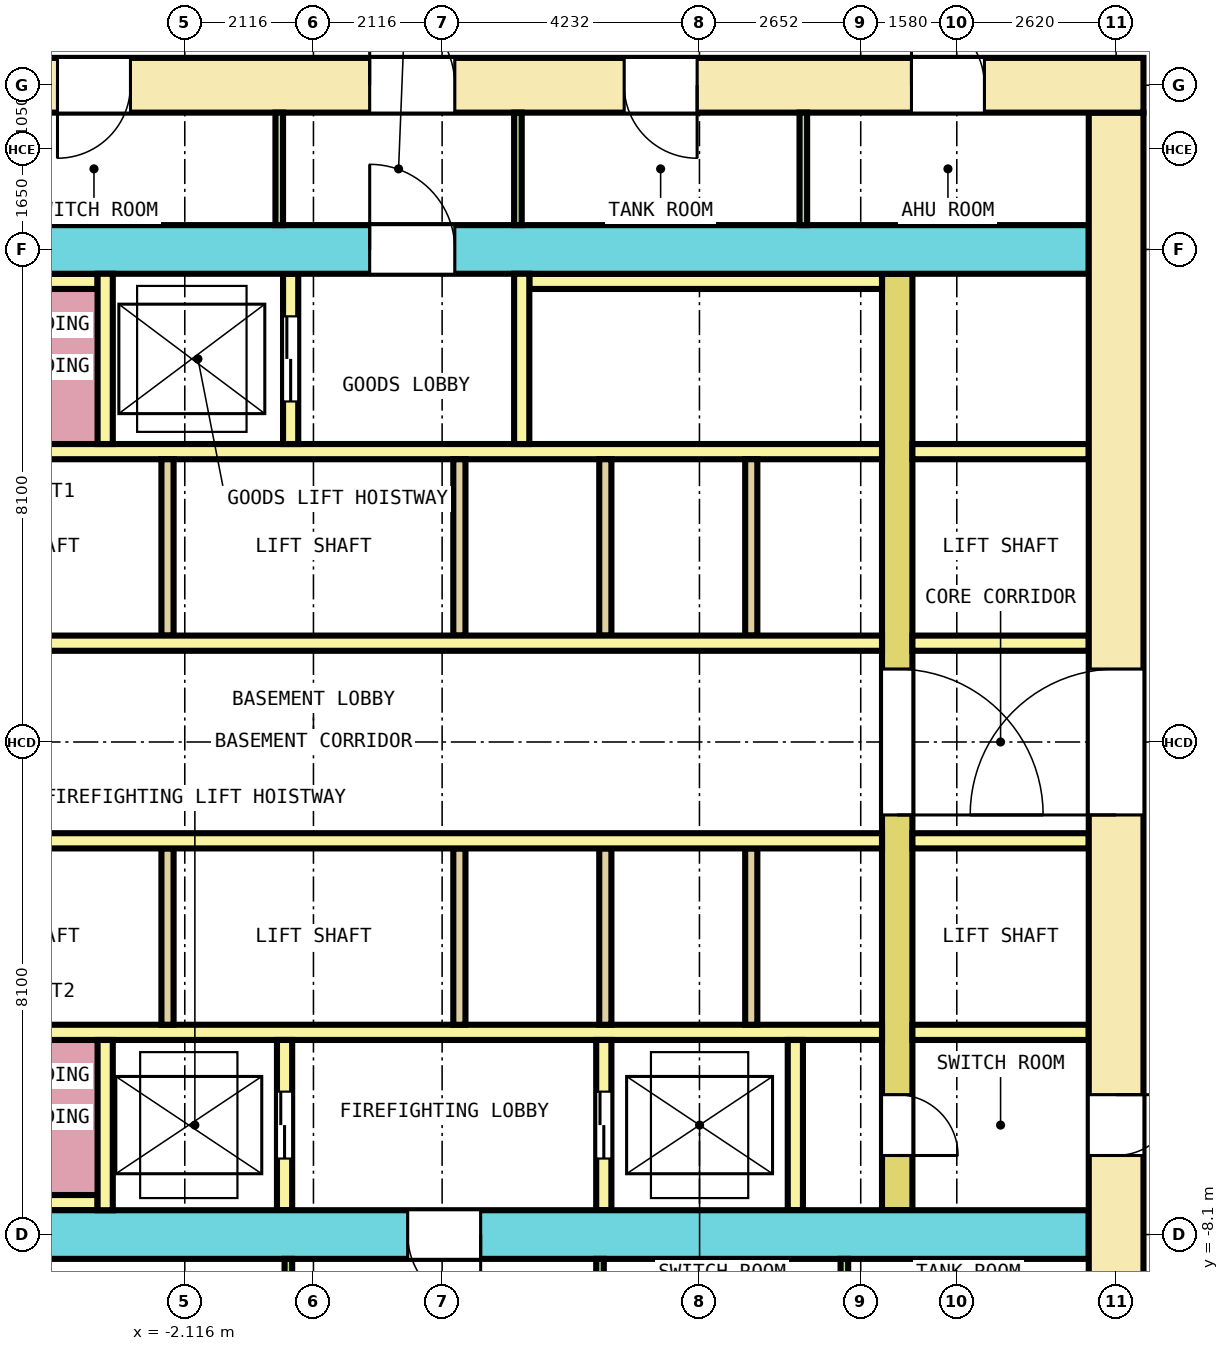
"""IFC4 building model, lengths in metres.
Left out: names, types, materials, properties, quantities, classifications, styles, units other than length and angle.
Written with IfcOpenShell. Run it as: python <this file> out.ifc"""

import sys

from ifc_helpers import new_model, si_unit, direction, frame, frame_2d, origin, place, context, subcontext, project, spatial, rectangle, extrude, element, fill, save


model = new_model("IFC4")
c1 = context("Model", 3, precision=1e-05, world=origin(), true_north=direction((0.0, 1.0)))
c2 = subcontext(c1, "Body", "Model", "MODEL_VIEW")
j1 = project(units=[si_unit("LENGTHUNIT", "METRE"), si_unit("PLANEANGLEUNIT", "RADIAN")], contexts=[c1])
p1 = place(None, origin())
s1 = spatial("IfcSite", under=j1, at=p1, CompositionType="ELEMENT")
p2 = place(p1, origin())
s2 = spatial("IfcBuilding", under=s1, at=p2, CompositionType="ELEMENT")
p3 = place(p2, frame((0.0, 0.0, -5.2)))
s3 = spatial("IfcBuildingStorey", under=s2, at=p3, CompositionType="ELEMENT", Elevation=-5.2)
p4 = place(p3, frame((-13.65, 10.8, 0.0), z_axis=(0.0, 0.0, 1.0), x_axis=(1.0, 0.0, 0.0)))
e1 = element("IfcWall", 1, at=p4, inside=s3, PredefinedType="SHEAR", context=c2, shape_type="SweptSolid", body=[
    extrude(rectangle(XDim=27.3, YDim=0.9, at=frame_2d((13.65, 0.0))), origin(), (0.0, 0.0, 1.0), 4.9),
])
p5 = place(p4, frame((3.316, 0.0, 0.0)))
e2 = element("IfcOpeningElement", 2, at=p5, cuts=e1, PredefinedType="OPENING", context=c2, shape_type="SweptSolid", body=[
    extrude(rectangle(XDim=1.2, YDim=2.1, at=frame_2d((0.6, 1.05))), frame((0.0, 0.46, 0.0), z_axis=(0.0, -1.0, 0.0), x_axis=(1.0, 0.0, 0.0)), (0.0, 0.0, 1.0), 0.92),
])
p6 = place(p4, frame((9.441, 0.0, 0.0)))
e3 = element("IfcOpeningElement", 3, at=p6, cuts=e1, PredefinedType="OPENING", context=c2, shape_type="SweptSolid", body=[
    extrude(rectangle(XDim=1.2, YDim=2.1, at=frame_2d((0.6, 1.05))), frame((0.0, 0.46, 0.0), z_axis=(0.0, -1.0, 0.0), x_axis=(1.0, 0.0, 0.0)), (0.0, 0.0, 1.0), 0.92),
])
p7 = place(p4, frame((18.76, 0.0, 0.0)))
e4 = element("IfcOpeningElement", 4, at=p7, cuts=e1, PredefinedType="OPENING", context=c2, shape_type="SweptSolid", body=[
    extrude(rectangle(XDim=1.2, YDim=2.1, at=frame_2d((0.6, 1.05))), frame((0.0, 0.46, 0.0), z_axis=(0.0, -1.0, 0.0), x_axis=(1.0, 0.0, 0.0)), (0.0, 0.0, 1.0), 0.92),
])
p8 = place(p4, frame((23.484, 0.0, 0.0)))
e5 = element("IfcOpeningElement", 5, at=p8, cuts=e1, PredefinedType="OPENING", context=c2, shape_type="SweptSolid", body=[
    extrude(rectangle(XDim=1.2, YDim=2.1, at=frame_2d((0.6, 1.05))), frame((0.0, 0.46, 0.0), z_axis=(0.0, -1.0, 0.0), x_axis=(1.0, 0.0, 0.0)), (0.0, 0.0, 1.0), 0.92),
])
p9 = place(p4, frame((14.575, 0.0, 0.0)))
e6 = element("IfcOpeningElement", 6, at=p9, cuts=e1, PredefinedType="OPENING", context=c2, shape_type="SweptSolid", body=[
    extrude(rectangle(XDim=1.4, YDim=2.1, at=frame_2d((0.7, 1.05))), frame((0.0, 0.46, 0.0), z_axis=(0.0, -1.0, 0.0), x_axis=(1.0, 0.0, 0.0)), (0.0, 0.0, 1.0), 0.92),
])
p10 = place(p3, frame((13.2, -10.35, 0.0), z_axis=(0.0, 0.0, 1.0), x_axis=(0.0, 1.0, 0.0)))
e7 = element("IfcWall", 7, at=p10, inside=s3, PredefinedType="SHEAR", context=c2, shape_type="SweptSolid", body=[
    extrude(rectangle(XDim=20.7, YDim=0.9, at=frame_2d((10.35, 0.0))), origin(), (0.0, 0.0, 1.0), 4.9),
])
p11 = place(p10, frame((9.15, 0.0, 0.0)))
e8 = element("IfcOpeningElement", 8, at=p11, cuts=e7, PredefinedType="OPENING", context=c2, shape_type="SweptSolid", body=[
    extrude(rectangle(XDim=2.4, YDim=2.1, at=frame_2d((1.2, 1.05))), frame((0.0, 0.46, 0.0), z_axis=(0.0, -1.0, 0.0), x_axis=(1.0, 0.0, 0.0)), (0.0, 0.0, 1.0), 0.92),
])
p12 = place(p10, frame((3.55, 0.0, 0.0)))
e9 = element("IfcOpeningElement", 9, at=p12, cuts=e7, PredefinedType="OPENING", context=c2, shape_type="SweptSolid", body=[
    extrude(rectangle(XDim=1.0, YDim=2.1, at=frame_2d((0.5, 1.05))), frame((0.0, 0.46, 0.0), z_axis=(0.0, -1.0, 0.0), x_axis=(1.0, 0.0, 0.0)), (0.0, 0.0, 1.0), 0.92),
])
p13 = place(p3, frame((-12.75, 8.1, 0.0), z_axis=(0.0, 0.0, 1.0), x_axis=(1.0, 0.0, 0.0)))
e10 = element("IfcWall", 10, at=p13, inside=s3, PredefinedType="SHEAR", context=c2, shape_type="SweptSolid", body=[
    extrude(rectangle(XDim=25.5, YDim=0.8, at=frame_2d((12.75, 0.0))), origin(), (0.0, 0.0, 1.0), 4.9),
])
p14 = place(p13, frame((13.675, 0.0, 0.0)))
e11 = element("IfcOpeningElement", 11, at=p14, cuts=e10, PredefinedType="OPENING", context=c2, shape_type="SweptSolid", body=[
    extrude(rectangle(XDim=1.4, YDim=2.1, at=frame_2d((0.7, 1.05))), frame((0.0, 0.41, 0.0), z_axis=(0.0, -1.0, 0.0), x_axis=(1.0, 0.0, 0.0)), (0.0, 0.0, 1.0), 0.82),
])
p15 = place(p3, frame((-12.75, -8.1, 0.0), z_axis=(0.0, 0.0, 1.0), x_axis=(1.0, 0.0, 0.0)))
e12 = element("IfcWall", 12, at=p15, inside=s3, PredefinedType="SHEAR", context=c2, shape_type="SweptSolid", body=[
    extrude(rectangle(XDim=25.5, YDim=0.8, at=frame_2d((12.75, 0.0))), origin(), (0.0, 0.0, 1.0), 4.9),
])
p16 = place(p15, frame((14.3, 0.0, 0.0)))
e13 = element("IfcOpeningElement", 13, at=p16, cuts=e12, PredefinedType="OPENING", context=c2, shape_type="SweptSolid", body=[
    extrude(rectangle(XDim=1.2, YDim=2.1, at=frame_2d((0.6, 1.05))), frame((0.0, 0.41, 0.0), z_axis=(0.0, -1.0, 0.0), x_axis=(1.0, 0.0, 0.0)), (0.0, 0.0, 1.0), 0.82),
])
p17 = place(p3, frame((9.6, -7.7, 0.0), z_axis=(0.0, 0.0, 1.0), x_axis=(0.0, 1.0, 0.0)))
e14 = element("IfcWall", 14, at=p17, inside=s3, PredefinedType="SHEAR", context=c2, shape_type="SweptSolid", body=[
    extrude(rectangle(XDim=15.4, YDim=0.5, at=frame_2d((7.7, 0.0))), origin(), (0.0, 0.0, 1.0), 4.9),
])
p18 = place(p17, frame((6.5, 0.0, 0.0)))
e15 = element("IfcOpeningElement", 15, at=p18, cuts=e14, PredefinedType="OPENING", context=c2, shape_type="SweptSolid", body=[
    extrude(rectangle(XDim=2.4, YDim=2.1, at=frame_2d((1.2, 1.05))), frame((0.0, 0.26, 0.0), z_axis=(0.0, -1.0, 0.0), x_axis=(1.0, 0.0, 0.0)), (0.0, 0.0, 1.0), 0.52),
])
p19 = place(p17, frame((0.9, 0.0, 0.0)))
e16 = element("IfcOpeningElement", 16, at=p19, cuts=e14, PredefinedType="OPENING", context=c2, shape_type="SweptSolid", body=[
    extrude(rectangle(XDim=1.0, YDim=2.1, at=frame_2d((0.5, 1.05))), frame((0.0, 0.26, 0.0), z_axis=(0.0, -1.0, 0.0), x_axis=(1.0, 0.0, 0.0)), (0.0, 0.0, 1.0), 0.52),
])
p20 = place(p3, frame((-9.35, 1.625, 0.0), z_axis=(0.0, 0.0, 1.0), x_axis=(1.0, 0.0, 0.0)))
e17 = element("IfcWall", 17, at=p20, inside=s3, PredefinedType="SOLIDWALL", context=c2, shape_type="SweptSolid", body=[
    extrude(rectangle(XDim=18.7, YDim=0.25, at=frame_2d((9.35, 0.0))), origin(), (0.0, 0.0, 1.0), 4.9),
])
p21 = place(p3, frame((9.85, 1.625, 0.0), z_axis=(0.0, 0.0, 1.0), x_axis=(1.0, 0.0, 0.0)))
e18 = element("IfcWall", 18, at=p21, inside=s3, PredefinedType="SOLIDWALL", context=c2, shape_type="SweptSolid", body=[
    extrude(rectangle(XDim=2.9, YDim=0.25, at=frame_2d((1.45, 0.0))), origin(), (0.0, 0.0, 1.0), 4.9),
])
p22 = place(p3, frame((-9.35, 4.775, 0.0), z_axis=(0.0, 0.0, 1.0), x_axis=(1.0, 0.0, 0.0)))
e19 = element("IfcWall", 19, at=p22, inside=s3, PredefinedType="SOLIDWALL", context=c2, shape_type="SweptSolid", body=[
    extrude(rectangle(XDim=18.7, YDim=0.25, at=frame_2d((9.35, 0.0))), origin(), (0.0, 0.0, 1.0), 4.9),
])
p23 = place(p3, frame((9.85, 4.775, 0.0), z_axis=(0.0, 0.0, 1.0), x_axis=(1.0, 0.0, 0.0)))
e20 = element("IfcWall", 20, at=p23, inside=s3, PredefinedType="SOLIDWALL", context=c2, shape_type="SweptSolid", body=[
    extrude(rectangle(XDim=2.9, YDim=0.25, at=frame_2d((1.45, 0.0))), origin(), (0.0, 0.0, 1.0), 4.9),
])
for number, where, z_axis, x_axis in (
    (21, (-2.4, 1.75, 0.0), (0.0, 0.0, 1.0), (0.0, 1.0, 0.0)),
    (22, (2.4, 1.75, 0.0), (0.0, 0.0, 1.0), (0.0, 1.0, 0.0)),
    (23, (4.8, 1.75, 0.0), (0.0, 0.0, 1.0), (0.0, 1.0, 0.0)),
    (24, (7.2, 1.75, 0.0), (0.0, 0.0, 1.0), (0.0, 1.0, 0.0)),
):
    element("IfcWall", number, at=place(p3, frame(where, z_axis=z_axis, x_axis=x_axis)), inside=s3, PredefinedType="SOLIDWALL", context=c2, shape_type="SweptSolid", body=[
        extrude(rectangle(XDim=2.9, YDim=0.2, at=frame_2d((1.45, 0.0))), origin(), (0.0, 0.0, 1.0), 4.9),
    ])
p24 = place(p3, frame((-9.35, -1.625, 0.0), z_axis=(0.0, 0.0, 1.0), x_axis=(1.0, 0.0, 0.0)))
e25 = element("IfcWall", 25, at=p24, inside=s3, PredefinedType="SOLIDWALL", context=c2, shape_type="SweptSolid", body=[
    extrude(rectangle(XDim=18.7, YDim=0.25, at=frame_2d((9.35, 0.0))), origin(), (0.0, 0.0, 1.0), 4.9),
])
p25 = place(p3, frame((9.85, -1.625, 0.0), z_axis=(0.0, 0.0, 1.0), x_axis=(1.0, 0.0, 0.0)))
e26 = element("IfcWall", 26, at=p25, inside=s3, PredefinedType="SOLIDWALL", context=c2, shape_type="SweptSolid", body=[
    extrude(rectangle(XDim=2.9, YDim=0.25, at=frame_2d((1.45, 0.0))), origin(), (0.0, 0.0, 1.0), 4.9),
])
p26 = place(p3, frame((-9.35, -4.775, 0.0), z_axis=(0.0, 0.0, 1.0), x_axis=(1.0, 0.0, 0.0)))
e27 = element("IfcWall", 27, at=p26, inside=s3, PredefinedType="SOLIDWALL", context=c2, shape_type="SweptSolid", body=[
    extrude(rectangle(XDim=18.7, YDim=0.25, at=frame_2d((9.35, 0.0))), origin(), (0.0, 0.0, 1.0), 4.9),
])
p27 = place(p3, frame((9.85, -4.775, 0.0), z_axis=(0.0, 0.0, 1.0), x_axis=(1.0, 0.0, 0.0)))
e28 = element("IfcWall", 28, at=p27, inside=s3, PredefinedType="SOLIDWALL", context=c2, shape_type="SweptSolid", body=[
    extrude(rectangle(XDim=2.9, YDim=0.25, at=frame_2d((1.45, 0.0))), origin(), (0.0, 0.0, 1.0), 4.9),
])
for number, where, z_axis, x_axis in (
    (29, (-2.4, -4.65, 0.0), (0.0, 0.0, 1.0), (0.0, 1.0, 0.0)),
    (30, (2.4, -4.65, 0.0), (0.0, 0.0, 1.0), (0.0, 1.0, 0.0)),
    (31, (4.8, -4.65, 0.0), (0.0, 0.0, 1.0), (0.0, 1.0, 0.0)),
    (32, (7.2, -4.65, 0.0), (0.0, 0.0, 1.0), (0.0, 1.0, 0.0)),
):
    element("IfcWall", number, at=place(p3, frame(where, z_axis=z_axis, x_axis=x_axis)), inside=s3, PredefinedType="SOLIDWALL", context=c2, shape_type="SweptSolid", body=[
        extrude(rectangle(XDim=2.9, YDim=0.2, at=frame_2d((1.45, 0.0))), origin(), (0.0, 0.0, 1.0), 4.9),
    ])
for number, where, z_axis, x_axis in (
    (33, (-9.35, 7.575, 0.0), (0.0, 0.0, 1.0), (1.0, 0.0, 0.0)),
    (34, (3.55, 7.575, 0.0), (0.0, 0.0, 1.0), (1.0, 0.0, 0.0)),
):
    element("IfcWall", number, at=place(p3, frame(where, z_axis=z_axis, x_axis=x_axis)), inside=s3, PredefinedType="SOLIDWALL", context=c2, shape_type="SweptSolid", body=[
        extrude(rectangle(XDim=5.8, YDim=0.25, at=frame_2d((2.9, 0.0))), origin(), (0.0, 0.0, 1.0), 4.9),
    ])
p28 = place(p3, frame((-3.425, 4.9, 0.0), z_axis=(0.0, 0.0, 1.0), x_axis=(0.0, 1.0, 0.0)))
e35 = element("IfcWall", 35, at=p28, inside=s3, PredefinedType="SOLIDWALL", context=c2, shape_type="SweptSolid", body=[
    extrude(rectangle(XDim=2.8, YDim=0.25, at=frame_2d((1.4, 0.0))), origin(), (0.0, 0.0, 1.0), 4.9),
])
p29 = place(p3, frame((-0.375, 4.9, 0.0), z_axis=(0.0, 0.0, 1.0), x_axis=(0.0, 1.0, 0.0)))
e36 = element("IfcWall", 36, at=p29, inside=s3, PredefinedType="SOLIDWALL", context=c2, shape_type="SweptSolid", body=[
    extrude(rectangle(XDim=2.8, YDim=0.25, at=frame_2d((1.4, 0.0))), origin(), (0.0, 0.0, 1.0), 4.9),
])
p30 = place(p29, frame((0.7, 0.0, 0.0)))
e37 = element("IfcOpeningElement", 37, at=p30, cuts=e36, PredefinedType="OPENING", context=c2, shape_type="SweptSolid", body=[
    extrude(rectangle(XDim=1.4, YDim=2.1, at=frame_2d((0.7, 1.05))), frame((0.0, 0.135, 0.0), z_axis=(0.0, -1.0, 0.0), x_axis=(1.0, 0.0, 0.0)), (0.0, 0.0, 1.0), 0.27),
])
p31 = place(p3, frame((3.425, 4.9, 0.0), z_axis=(0.0, 0.0, 1.0), x_axis=(0.0, 1.0, 0.0)))
e38 = element("IfcWall", 38, at=p31, inside=s3, PredefinedType="SOLIDWALL", context=c2, shape_type="SweptSolid", body=[
    extrude(rectangle(XDim=2.8, YDim=0.25, at=frame_2d((1.4, 0.0))), origin(), (0.0, 0.0, 1.0), 4.9),
])
p32 = place(p3, frame((-9.35, -7.575, 0.0), z_axis=(0.0, 0.0, 1.0), x_axis=(1.0, 0.0, 0.0)))
e39 = element("IfcWall", 39, at=p32, inside=s3, PredefinedType="SOLIDWALL", context=c2, shape_type="SweptSolid", body=[
    extrude(rectangle(XDim=5.8, YDim=0.25, at=frame_2d((2.9, 0.0))), origin(), (0.0, 0.0, 1.0), 4.9),
])
p33 = place(p3, frame((-3.425, -7.7, 0.0), z_axis=(0.0, 0.0, 1.0), x_axis=(0.0, 1.0, 0.0)))
e40 = element("IfcWall", 40, at=p33, inside=s3, PredefinedType="SOLIDWALL", context=c2, shape_type="SweptSolid", body=[
    extrude(rectangle(XDim=2.8, YDim=0.25, at=frame_2d((1.4, 0.0))), origin(), (0.0, 0.0, 1.0), 4.9),
])
p34 = place(p3, frame((-0.475, -7.7, 0.0), z_axis=(0.0, 0.0, 1.0), x_axis=(0.0, 1.0, 0.0)))
e41 = element("IfcWall", 41, at=p34, inside=s3, PredefinedType="SOLIDWALL", context=c2, shape_type="SweptSolid", body=[
    extrude(rectangle(XDim=2.8, YDim=0.25, at=frame_2d((1.4, 0.0))), origin(), (0.0, 0.0, 1.0), 4.9),
])
p35 = place(p34, frame((0.85, 0.0, 0.0)))
e42 = element("IfcOpeningElement", 42, at=p35, cuts=e41, PredefinedType="OPENING", context=c2, shape_type="SweptSolid", body=[
    extrude(rectangle(XDim=1.1, YDim=2.1, at=frame_2d((0.55, 1.05))), frame((0.0, 0.135, 0.0), z_axis=(0.0, -1.0, 0.0), x_axis=(1.0, 0.0, 0.0)), (0.0, 0.0, 1.0), 0.27),
])
p36 = place(p3, frame((4.775, -7.7, 0.0), z_axis=(0.0, 0.0, 1.0), x_axis=(0.0, 1.0, 0.0)))
e43 = element("IfcWall", 43, at=p36, inside=s3, PredefinedType="SOLIDWALL", context=c2, shape_type="SweptSolid", body=[
    extrude(rectangle(XDim=2.8, YDim=0.25, at=frame_2d((1.4, 0.0))), origin(), (0.0, 0.0, 1.0), 4.9),
])
p37 = place(p36, frame((0.85, 0.0, 0.0)))
e44 = element("IfcOpeningElement", 44, at=p37, cuts=e43, PredefinedType="OPENING", context=c2, shape_type="SweptSolid", body=[
    extrude(rectangle(XDim=1.1, YDim=2.1, at=frame_2d((0.55, 1.05))), frame((0.0, 0.135, 0.0), z_axis=(0.0, -1.0, 0.0), x_axis=(1.0, 0.0, 0.0)), (0.0, 0.0, 1.0), 0.27),
])
p38 = place(p3, frame((7.925, -7.7, 0.0), z_axis=(0.0, 0.0, 1.0), x_axis=(0.0, 1.0, 0.0)))
e45 = element("IfcWall", 45, at=p38, inside=s3, PredefinedType="SOLIDWALL", context=c2, shape_type="SweptSolid", body=[
    extrude(rectangle(XDim=2.8, YDim=0.25, at=frame_2d((1.4, 0.0))), origin(), (0.0, 0.0, 1.0), 4.9),
])
for number, where, z_axis, x_axis in (
    (46, (-0.562, 8.5, 0.0), (0.0, 0.0, 1.0), (0.0, 1.0, 0.0)),
    (47, (3.363, 8.5, 0.0), (0.0, 0.0, 1.0), (0.0, 1.0, 0.0)),
    (48, (8.056, 8.5, 0.0), (0.0, 0.0, 1.0), (0.0, 1.0, 0.0)),
    (49, (-0.413, -10.35, 0.0), (0.0, 0.0, 1.0), (0.0, 1.0, 0.0)),
    (50, (4.712, -10.35, 0.0), (0.0, 0.0, 1.0), (0.0, 1.0, 0.0)),
    (51, (8.731, -10.35, 0.0), (0.0, 0.0, 1.0), (0.0, 1.0, 0.0)),
):
    element("IfcWall", number, at=place(p3, frame(where, z_axis=z_axis, x_axis=x_axis)), inside=s3, PredefinedType="PARTITIONING", context=c2, shape_type="SweptSolid", body=[
        extrude(rectangle(XDim=1.85, YDim=0.125, at=frame_2d((0.925, 0.0))), origin(), (0.0, 0.0, 1.0), 4.9),
    ])
p39 = place(p35, origin())
e52 = element("IfcDoor", 52, at=p39, inside=s3, OperationType="DOUBLE_DOOR_SLIDING", PredefinedType="DOOR", context=c2, shape_type="SweptSolid", body=[
    extrude(rectangle(XDim=1.1, YDim=2.1, at=frame_2d((0.55, 1.05))), frame((0.0, 0.075, 0.0), z_axis=(0.0, -1.0, 0.0), x_axis=(1.0, 0.0, 0.0)), (0.0, 0.0, 1.0), 0.15),
])
fill(e42, e52)
p40 = place(p37, origin())
e53 = element("IfcDoor", 53, at=p40, inside=s3, OperationType="DOUBLE_DOOR_SLIDING", PredefinedType="DOOR", context=c2, shape_type="SweptSolid", body=[
    extrude(rectangle(XDim=1.1, YDim=2.1, at=frame_2d((0.55, 1.05))), frame((0.0, 0.075, 0.0), z_axis=(0.0, -1.0, 0.0), x_axis=(1.0, 0.0, 0.0)), (0.0, 0.0, 1.0), 0.15),
])
fill(e44, e53)
p41 = place(p30, origin())
e54 = element("IfcDoor", 54, at=p41, inside=s3, OperationType="DOUBLE_DOOR_SLIDING", PredefinedType="DOOR", context=c2, shape_type="SweptSolid", body=[
    extrude(rectangle(XDim=1.4, YDim=2.1, at=frame_2d((0.7, 1.05))), frame((0.0, 0.075, 0.0), z_axis=(0.0, -1.0, 0.0), x_axis=(1.0, 0.0, 0.0)), (0.0, 0.0, 1.0), 0.15),
])
fill(e37, e54)
p42 = place(p18, origin())
e55 = element("IfcDoor", 55, at=p42, inside=s3, OperationType="DOUBLE_DOOR_SINGLE_SWING", PredefinedType="DOOR", context=c2, shape_type="SweptSolid", body=[
    extrude(rectangle(XDim=2.4, YDim=2.1, at=frame_2d((1.2, 1.05))), frame((0.0, 0.2, 0.0), z_axis=(0.0, -1.0, 0.0), x_axis=(1.0, 0.0, 0.0)), (0.0, 0.0, 1.0), 0.4),
])
fill(e15, e55)
p43 = place(p11, origin())
e56 = element("IfcDoor", 56, at=p43, inside=s3, OperationType="DOUBLE_DOOR_SINGLE_SWING", PredefinedType="DOOR", context=c2, shape_type="SweptSolid", body=[
    extrude(rectangle(XDim=2.4, YDim=2.1, at=frame_2d((1.2, 1.05))), frame((0.0, 0.3, 0.0), z_axis=(0.0, -1.0, 0.0), x_axis=(1.0, 0.0, 0.0)), (0.0, 0.0, 1.0), 0.6),
])
fill(e8, e56)
p44 = place(p16, origin())
e57 = element("IfcDoor", 57, at=p44, inside=s3, OperationType="SINGLE_SWING_RIGHT", PredefinedType="DOOR", context=c2, shape_type="SweptSolid", body=[
    extrude(rectangle(XDim=1.2, YDim=2.1, at=frame_2d((0.6, 1.05))), frame((0.0, 0.3, 0.0), z_axis=(0.0, -1.0, 0.0), x_axis=(1.0, 0.0, 0.0)), (0.0, 0.0, 1.0), 0.6),
])
fill(e13, e57)
p45 = place(p14, origin())
e58 = element("IfcDoor", 58, at=p45, inside=s3, OperationType="DOUBLE_DOOR_SINGLE_SWING", PredefinedType="DOOR", context=c2, shape_type="SweptSolid", body=[
    extrude(rectangle(XDim=1.4, YDim=2.1, at=frame_2d((0.7, 1.05))), frame((0.0, 0.3, 0.0), z_axis=(0.0, -1.0, 0.0), x_axis=(1.0, 0.0, 0.0)), (0.0, 0.0, 1.0), 0.6),
])
fill(e11, e58)
p46 = place(p19, origin())
e59 = element("IfcDoor", 59, at=p46, inside=s3, OperationType="SINGLE_SWING_RIGHT", PredefinedType="DOOR", context=c2, shape_type="SweptSolid", body=[
    extrude(rectangle(XDim=1.0, YDim=2.1, at=frame_2d((0.5, 1.05))), frame((0.0, 0.2, 0.0), z_axis=(0.0, -1.0, 0.0), x_axis=(1.0, 0.0, 0.0)), (0.0, 0.0, 1.0), 0.4),
])
fill(e16, e59)
p47 = place(p12, origin())
e60 = element("IfcDoor", 60, at=p47, inside=s3, OperationType="SINGLE_SWING_LEFT", PredefinedType="DOOR", context=c2, shape_type="SweptSolid", body=[
    extrude(rectangle(XDim=1.0, YDim=2.1, at=frame_2d((0.5, 1.05))), frame((0.0, 0.3, 0.0), z_axis=(0.0, -1.0, 0.0), x_axis=(1.0, 0.0, 0.0)), (0.0, 0.0, 1.0), 0.6),
])
fill(e9, e60)
p48 = place(p6, origin())
e61 = element("IfcDoor", 61, at=p48, inside=s3, OperationType="SINGLE_SWING_LEFT", PredefinedType="DOOR", context=c2, shape_type="SweptSolid", body=[
    extrude(rectangle(XDim=1.2, YDim=2.1, at=frame_2d((0.6, 1.05))), frame((0.0, 0.3, 0.0), z_axis=(0.0, -1.0, 0.0), x_axis=(1.0, 0.0, 0.0)), (0.0, 0.0, 1.0), 0.6),
])
fill(e3, e61)
p49 = place(p7, origin())
e62 = element("IfcDoor", 62, at=p49, inside=s3, OperationType="SINGLE_SWING_RIGHT", PredefinedType="DOOR", context=c2, shape_type="SweptSolid", body=[
    extrude(rectangle(XDim=1.2, YDim=2.1, at=frame_2d((0.6, 1.05))), frame((0.0, 0.3, 0.0), z_axis=(0.0, -1.0, 0.0), x_axis=(1.0, 0.0, 0.0)), (0.0, 0.0, 1.0), 0.6),
])
fill(e4, e62)
p50 = place(p8, origin())
e63 = element("IfcDoor", 63, at=p50, inside=s3, OperationType="SINGLE_SWING_LEFT", PredefinedType="DOOR", context=c2, shape_type="SweptSolid", body=[
    extrude(rectangle(XDim=1.2, YDim=2.1, at=frame_2d((0.6, 1.05))), frame((0.0, 0.3, 0.0), z_axis=(0.0, -1.0, 0.0), x_axis=(1.0, 0.0, 0.0)), (0.0, 0.0, 1.0), 0.6),
])
fill(e5, e63)
p51 = place(p9, origin())
e64 = element("IfcDoor", 64, at=p51, inside=s3, OperationType="DOUBLE_DOOR_SINGLE_SWING", PredefinedType="DOOR", context=c2, shape_type="SweptSolid", body=[
    extrude(rectangle(XDim=1.4, YDim=2.1, at=frame_2d((0.7, 1.05))), frame((0.0, 0.3, 0.0), z_axis=(0.0, -1.0, 0.0), x_axis=(1.0, 0.0, 0.0)), (0.0, 0.0, 1.0), 0.6),
])
fill(e6, e64)
save(model, sys.argv[1])
